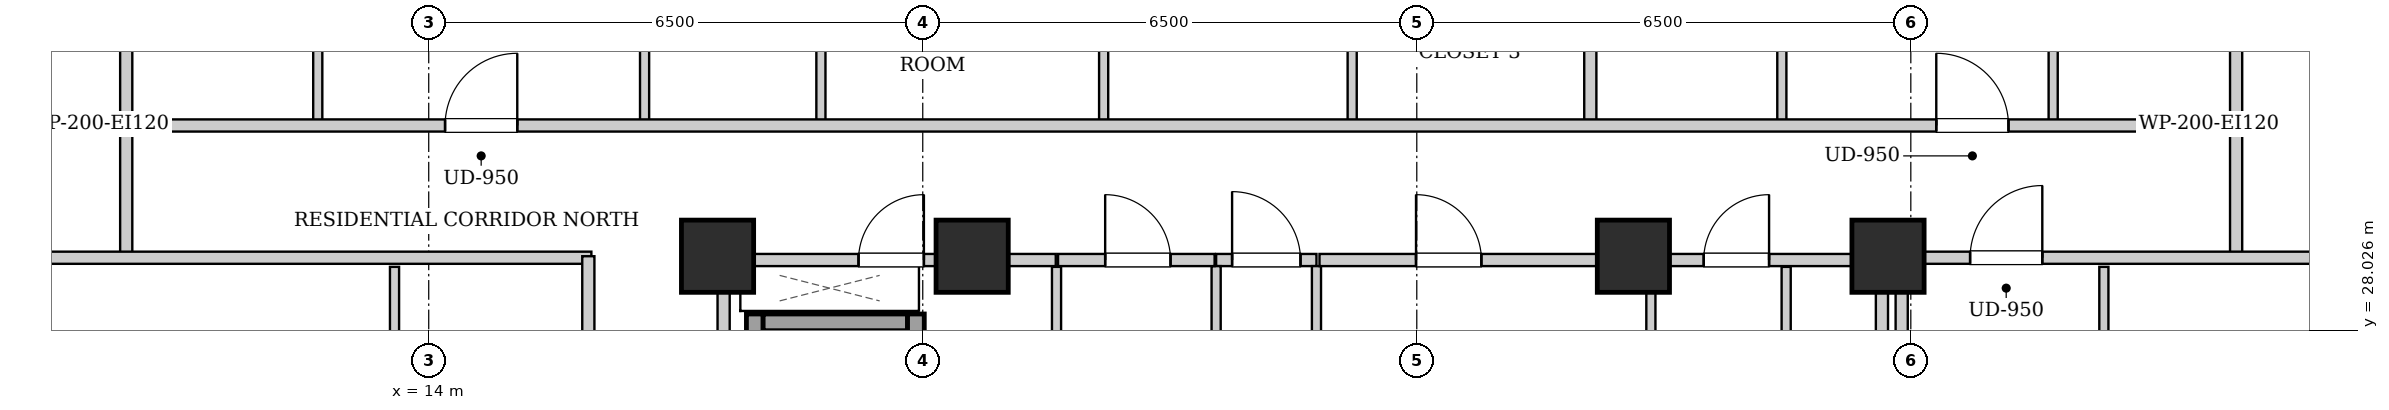
"""IFC4 building model, lengths in metres.
Left out: names, types, materials, properties, quantities, classifications, styles, units other than length and angle.
Written with IfcOpenShell. Run it as: python <this file> out.ifc"""

import sys

from ifc_helpers import new_model, si_unit, direction, frame, frame_2d, origin, origin_2d, place, context, subcontext, project, spatial, rectangle, extrude, element, fill, save


model = new_model("IFC4")
c1 = context("Model", 3, precision=1e-05, world=origin(), true_north=direction((0.0, 1.0)))
c2 = subcontext(c1, "Body", "Model", "MODEL_VIEW")
j1 = project(units=[si_unit("LENGTHUNIT", "METRE"), si_unit("PLANEANGLEUNIT", "RADIAN")], contexts=[c1])
p1 = place(None, origin())
s1 = spatial("IfcSite", under=j1, at=p1, CompositionType="ELEMENT")
p2 = place(p1, origin())
s2 = spatial("IfcBuilding", under=s1, at=p2, CompositionType="ELEMENT")
p3 = place(p2, frame((0.0, 0.0, 134.15)))
s3 = spatial("IfcBuildingStorey", under=s2, at=p3, CompositionType="ELEMENT", Elevation=134.15)
for number, where, z_axis, x_axis in (
    (1, (17.8, 29.0, 0.0), (0.0, 0.0, 1.0), (1.0, 0.0, 0.0)),
    (2, (21.15, 29.0, 0.0), (0.0, 0.0, 1.0), (1.0, 0.0, 0.0)),
    (3, (29.85, 29.0, 0.0), (0.0, 0.0, 1.0), (1.0, 0.0, 0.0)),
    (4, (33.2, 29.0, 0.0), (0.0, 0.0, 1.0), (1.0, 0.0, 0.0)),
):
    element("IfcColumn", number, at=place(p3, frame(where, z_axis=z_axis, x_axis=x_axis)), inside=s3, PredefinedType="COLUMN", context=c2, shape_type="SweptSolid", body=[
        extrude(rectangle(XDim=0.95, YDim=0.95, at=origin_2d()), origin(), (0.0, 0.0, 1.0), 3.25),
    ])
p4 = place(p3, frame((18.29, 24.1, 0.0), z_axis=(0.0, 0.0, 1.0), x_axis=(0.0, 1.0, 0.0)))
e5 = element("IfcWall", 5, at=p4, inside=s3, PredefinedType="SHEAR", context=c2, shape_type="SweptSolid", body=[
    extrude(rectangle(XDim=4.14, YDim=0.22, at=frame_2d((2.07, 0.0))), origin(), (0.0, 0.0, 1.0), 2.99),
])
p5 = place(p3, frame((18.4, 28.13, 0.0), z_axis=(0.0, 0.0, 1.0), x_axis=(1.0, 0.0, 0.0)))
e6 = element("IfcWall", 6, at=p5, inside=s3, PredefinedType="SHEAR", context=c2, shape_type="SweptSolid", body=[
    extrude(rectangle(XDim=1.9, YDim=0.22, at=frame_2d((0.95, 0.0))), origin(), (0.0, 0.0, 1.0), 2.99),
])
p6 = place(p3, frame((20.41, 26.06, 0.0), z_axis=(0.0, 0.0, 1.0), x_axis=(0.0, 1.0, 0.0)))
e7 = element("IfcWall", 7, at=p6, inside=s3, PredefinedType="SHEAR", context=c2, shape_type="SweptSolid", body=[
    extrude(rectangle(XDim=2.18, YDim=0.22, at=frame_2d((1.09, 0.0))), origin(), (0.0, 0.0, 1.0), 2.99),
])
for number, where, z_axis, x_axis in (
    (8, (17.88, 24.12, 0.0), (0.0, 0.0, 1.0), (0.0, 1.0, 0.0)),
    (9, (33.12, 24.12, 0.0), (0.0, 0.0, 1.0), (0.0, 1.0, 0.0)),
):
    element("IfcWall", number, at=place(p3, frame(where, z_axis=z_axis, x_axis=x_axis)), inside=s3, PredefinedType="PARTITIONING", context=c2, shape_type="SweptSolid", body=[
        extrude(rectangle(XDim=4.76, YDim=0.16, at=frame_2d((2.38, 0.0))), origin(), (0.0, 0.0, 1.0), 2.99),
    ])
p7 = place(p3, frame((24.36, 28.95, 0.0), z_axis=(0.0, 0.0, 1.0), x_axis=(1.0, 0.0, 0.0)))
e10 = element("IfcWall", 10, at=p7, inside=s3, PredefinedType="PARTITIONING", context=c2, shape_type="SweptSolid", body=[
    extrude(rectangle(XDim=1.32, YDim=0.16, at=frame_2d((0.66, 0.0))), origin(), (0.0, 0.0, 1.0), 2.426),
])
p8 = place(p7, frame((0.21, 0.0, 0.0)))
e11 = element("IfcOpeningElement", 11, at=p8, cuts=e10, PredefinedType="OPENING", context=c2, shape_type="SweptSolid", body=[
    extrude(rectangle(XDim=0.9, YDim=2.05, at=frame_2d((0.45, 1.025))), frame((0.0, 0.09, 0.0), z_axis=(0.0, -1.0, 0.0), x_axis=(1.0, 0.0, 0.0)), (0.0, 0.0, 1.0), 0.18),
])
p9 = place(p3, frame((17.96, 28.95, 0.0), z_axis=(0.0, 0.0, 1.0), x_axis=(1.0, 0.0, 0.0)))
e12 = element("IfcWall", 12, at=p9, inside=s3, PredefinedType="PARTITIONING", context=c2, shape_type="SweptSolid", body=[
    extrude(rectangle(XDim=4.29, YDim=0.16, at=frame_2d((2.145, 0.0))), origin(), (0.0, 0.0, 1.0), 2.426),
])
p10 = place(p9, frame((1.695, 0.0, 0.0)))
e13 = element("IfcOpeningElement", 13, at=p10, cuts=e12, PredefinedType="OPENING", context=c2, shape_type="SweptSolid", body=[
    extrude(rectangle(XDim=0.86, YDim=2.05, at=frame_2d((0.43, 1.025))), frame((0.0, 0.09, 0.0), z_axis=(0.0, -1.0, 0.0), x_axis=(1.0, 0.0, 0.0)), (0.0, 0.0, 1.0), 0.18),
])
for number, where, z_axis, x_axis in (
    (14, (24.36, 25.0, 0.0), (0.0, 0.0, 1.0), (0.0, 1.0, 0.0)),
    (15, (25.68, 25.0, 0.0), (0.0, 0.0, 1.0), (0.0, 1.0, 0.0)),
):
    element("IfcWall", number, at=place(p3, frame(where, z_axis=z_axis, x_axis=x_axis)), inside=s3, PredefinedType="PARTITIONING", context=c2, shape_type="SweptSolid", body=[
        extrude(rectangle(XDim=3.87, YDim=0.12, at=frame_2d((1.935, 0.0))), origin(), (0.0, 0.0, 1.0), 2.99),
    ])
p11 = place(p3, frame((30.08, 26.18, 0.0), z_axis=(0.0, 0.0, 1.0), x_axis=(0.0, 1.0, 0.0)))
e16 = element("IfcWall", 16, at=p11, inside=s3, PredefinedType="PARTITIONING", context=c2, shape_type="SweptSolid", body=[
    extrude(rectangle(XDim=2.68, YDim=0.12, at=frame_2d((1.34, 0.0))), origin(), (0.0, 0.0, 1.0), 2.99),
])
p12 = place(p3, frame((31.86, 26.2, 0.0), z_axis=(0.0, 0.0, 1.0), x_axis=(0.0, 1.0, 0.0)))
e17 = element("IfcWall", 17, at=p12, inside=s3, PredefinedType="PARTITIONING", context=c2, shape_type="SweptSolid", body=[
    extrude(rectangle(XDim=2.66, YDim=0.12, at=frame_2d((1.33, 0.0))), origin(), (0.0, 0.0, 1.0), 2.99),
])
p13 = place(p12, frame((0.92, 0.0, 0.0)))
e18 = element("IfcOpeningElement", 18, at=p13, cuts=e17, PredefinedType="OPENING", context=c2, shape_type="SweptSolid", body=[
    extrude(rectangle(XDim=0.86, YDim=2.05, at=frame_2d((0.43, 1.025))), frame((0.0, 0.07, 0.0), z_axis=(0.0, -1.0, 0.0), x_axis=(1.0, 0.0, 0.0)), (0.0, 0.0, 1.0), 0.14),
])
p14 = place(p3, frame((30.08, 28.95, 0.0), z_axis=(0.0, 0.0, 1.0), x_axis=(1.0, 0.0, 0.0)))
e19 = element("IfcWall", 19, at=p14, inside=s3, PredefinedType="PARTITIONING", context=c2, shape_type="SweptSolid", body=[
    extrude(rectangle(XDim=2.96, YDim=0.16, at=frame_2d((1.48, 0.0))), origin(), (0.0, 0.0, 1.0), 2.99),
])
p15 = place(p14, frame((0.695, 0.0, 0.0)))
e20 = element("IfcOpeningElement", 20, at=p15, cuts=e19, PredefinedType="OPENING", context=c2, shape_type="SweptSolid", body=[
    extrude(rectangle(XDim=0.86, YDim=2.05, at=frame_2d((0.43, 1.025))), frame((0.0, 0.09, 0.0), z_axis=(0.0, -1.0, 0.0), x_axis=(1.0, 0.0, 0.0)), (0.0, 0.0, 1.0), 0.18),
])
p16 = place(p3, frame((22.26, 25.0, 0.0), z_axis=(0.0, 0.0, 1.0), x_axis=(0.0, 1.0, 0.0)))
e21 = element("IfcWall", 21, at=p16, inside=s3, PredefinedType="PARTITIONING", context=c2, shape_type="SweptSolid", body=[
    extrude(rectangle(XDim=3.86, YDim=0.12, at=frame_2d((1.93, 0.0))), origin(), (0.0, 0.0, 1.0), 2.99),
])
p17 = place(p3, frame((22.28, 28.95, 0.0), z_axis=(0.0, 0.0, 1.0), x_axis=(1.0, 0.0, 0.0)))
e22 = element("IfcWall", 22, at=p17, inside=s3, PredefinedType="PARTITIONING", context=c2, shape_type="SweptSolid", body=[
    extrude(rectangle(XDim=2.06, YDim=0.16, at=frame_2d((1.03, 0.0))), origin(), (0.0, 0.0, 1.0), 2.426),
])
p18 = place(p17, frame((0.62, 0.0, 0.0)))
e23 = element("IfcOpeningElement", 23, at=p18, cuts=e22, PredefinedType="OPENING", context=c2, shape_type="SweptSolid", body=[
    extrude(rectangle(XDim=0.86, YDim=2.05, at=frame_2d((0.43, 1.025))), frame((0.0, 0.09, 0.0), z_axis=(0.0, -1.0, 0.0), x_axis=(1.0, 0.0, 0.0)), (0.0, 0.0, 1.0), 0.18),
])
p19 = place(p3, frame((25.72, 28.95, 0.0), z_axis=(0.0, 0.0, 1.0), x_axis=(1.0, 0.0, 0.0)))
e24 = element("IfcWall", 24, at=p19, inside=s3, PredefinedType="PARTITIONING", context=c2, shape_type="SweptSolid", body=[
    extrude(rectangle(XDim=4.32, YDim=0.16, at=frame_2d((2.16, 0.0))), origin(), (0.0, 0.0, 1.0), 2.426),
])
p20 = place(p19, frame((1.27, 0.0, 0.0)))
e25 = element("IfcOpeningElement", 25, at=p20, cuts=e24, PredefinedType="OPENING", context=c2, shape_type="SweptSolid", body=[
    extrude(rectangle(XDim=0.86, YDim=2.05, at=frame_2d((0.43, 1.025))), frame((0.0, 0.09, 0.0), z_axis=(0.0, -1.0, 0.0), x_axis=(1.0, 0.0, 0.0)), (0.0, 0.0, 1.0), 0.18),
])
for number, where, z_axis, x_axis in (
    (26, (10.02, 28.98, 0.0), (0.0, 0.0, 1.0), (0.0, 1.0, 0.0)),
    (27, (37.78, 28.98, 0.0), (0.0, 0.0, 1.0), (0.0, 1.0, 0.0)),
):
    element("IfcWall", number, at=place(p3, frame(where, z_axis=z_axis, x_axis=x_axis)), inside=s3, PredefinedType="PARTITIONING", context=c2, shape_type="SweptSolid", body=[
        extrude(rectangle(XDim=1.74, YDim=0.16, at=frame_2d((0.87, 0.0))), origin(), (0.0, 0.0, 1.0), 2.99),
    ])
p21 = place(p3, frame((7.78, 28.98, 0.0), z_axis=(0.0, 0.0, 1.0), x_axis=(1.0, 0.0, 0.0)))
e28 = element("IfcWall", 28, at=p21, inside=s3, PredefinedType="PARTITIONING", context=c2, shape_type="SweptSolid", body=[
    extrude(rectangle(XDim=8.36, YDim=0.16, at=frame_2d((4.18, 0.0))), origin(), (0.0, 0.0, 1.0), 2.426),
])
p22 = place(p3, frame((10.02, 30.76, 0.0), z_axis=(0.0, 0.0, 1.0), x_axis=(0.0, 1.0, 0.0)))
e29 = element("IfcWall", 29, at=p22, inside=s3, PredefinedType="PARTITIONING", context=c2, shape_type="SweptSolid", body=[
    extrude(rectangle(XDim=2.91, YDim=0.16, at=frame_2d((1.455, 0.0))), origin(), (0.0, 0.0, 1.0), 2.99),
])
p23 = place(p3, frame((12.54, 30.76, 0.0), z_axis=(0.0, 0.0, 1.0), x_axis=(0.0, 1.0, 0.0)))
e30 = element("IfcWall", 30, at=p23, inside=s3, PredefinedType="PARTITIONING", context=c2, shape_type="SweptSolid", body=[
    extrude(rectangle(XDim=2.85, YDim=0.12, at=frame_2d((1.425, 0.0))), origin(), (0.0, 0.0, 1.0), 2.99),
])
p24 = place(p23, frame((0.995, 0.0, 0.0)))
e31 = element("IfcOpeningElement", 31, at=p24, cuts=e30, PredefinedType="OPENING", context=c2, shape_type="SweptSolid", body=[
    extrude(rectangle(XDim=0.86, YDim=2.05, at=frame_2d((0.43, 1.025))), frame((0.0, 0.07, 0.0), z_axis=(0.0, -1.0, 0.0), x_axis=(1.0, 0.0, 0.0)), (0.0, 0.0, 1.0), 0.14),
])
p25 = place(p3, frame((16.84, 30.76, 0.0), z_axis=(0.0, 0.0, 1.0), x_axis=(0.0, 1.0, 0.0)))
e32 = element("IfcWall", 32, at=p25, inside=s3, PredefinedType="PARTITIONING", context=c2, shape_type="SweptSolid", body=[
    extrude(rectangle(XDim=2.85, YDim=0.12, at=frame_2d((1.425, 0.0))), origin(), (0.0, 0.0, 1.0), 2.99),
])
p26 = place(p25, frame((0.975, 0.0, 0.0)))
e33 = element("IfcOpeningElement", 33, at=p26, cuts=e32, PredefinedType="OPENING", context=c2, shape_type="SweptSolid", body=[
    extrude(rectangle(XDim=0.9, YDim=2.05, at=frame_2d((0.45, 1.025))), frame((0.0, 0.07, 0.0), z_axis=(0.0, -1.0, 0.0), x_axis=(1.0, 0.0, 0.0)), (0.0, 0.0, 1.0), 0.14),
])
p27 = place(p3, frame((19.16, 30.76, 0.0), z_axis=(0.0, 0.0, 1.0), x_axis=(0.0, 1.0, 0.0)))
e34 = element("IfcWall", 34, at=p27, inside=s3, PredefinedType="PARTITIONING", context=c2, shape_type="SweptSolid", body=[
    extrude(rectangle(XDim=2.85, YDim=0.12, at=frame_2d((1.425, 0.0))), origin(), (0.0, 0.0, 1.0), 2.99),
])
p28 = place(p27, frame((0.975, 0.0, 0.0)))
e35 = element("IfcOpeningElement", 35, at=p28, cuts=e34, PredefinedType="OPENING", context=c2, shape_type="SweptSolid", body=[
    extrude(rectangle(XDim=0.9, YDim=2.05, at=frame_2d((0.45, 1.025))), frame((0.0, 0.07, 0.0), z_axis=(0.0, -1.0, 0.0), x_axis=(1.0, 0.0, 0.0)), (0.0, 0.0, 1.0), 0.14),
])
p29 = place(p3, frame((22.88, 30.76, 0.0), z_axis=(0.0, 0.0, 1.0), x_axis=(0.0, 1.0, 0.0)))
e36 = element("IfcWall", 36, at=p29, inside=s3, PredefinedType="PARTITIONING", context=c2, shape_type="SweptSolid", body=[
    extrude(rectangle(XDim=2.85, YDim=0.12, at=frame_2d((1.425, 0.0))), origin(), (0.0, 0.0, 1.0), 2.99),
])
p30 = place(p29, frame((0.975, 0.0, 0.0)))
e37 = element("IfcOpeningElement", 37, at=p30, cuts=e36, PredefinedType="OPENING", context=c2, shape_type="SweptSolid", body=[
    extrude(rectangle(XDim=0.9, YDim=2.05, at=frame_2d((0.45, 1.025))), frame((0.0, 0.07, 0.0), z_axis=(0.0, -1.0, 0.0), x_axis=(1.0, 0.0, 0.0)), (0.0, 0.0, 1.0), 0.14),
])
p31 = place(p3, frame((26.15, 30.76, 0.0), z_axis=(0.0, 0.0, 1.0), x_axis=(0.0, 1.0, 0.0)))
e38 = element("IfcWall", 38, at=p31, inside=s3, PredefinedType="PARTITIONING", context=c2, shape_type="SweptSolid", body=[
    extrude(rectangle(XDim=2.85, YDim=0.12, at=frame_2d((1.425, 0.0))), origin(), (0.0, 0.0, 1.0), 2.99),
])
p32 = place(p31, frame((0.975, 0.0, 0.0)))
e39 = element("IfcOpeningElement", 39, at=p32, cuts=e38, PredefinedType="OPENING", context=c2, shape_type="SweptSolid", body=[
    extrude(rectangle(XDim=0.9, YDim=2.05, at=frame_2d((0.45, 1.025))), frame((0.0, 0.07, 0.0), z_axis=(0.0, -1.0, 0.0), x_axis=(1.0, 0.0, 0.0)), (0.0, 0.0, 1.0), 0.14),
])
p33 = place(p3, frame((37.78, 30.76, 0.0), z_axis=(0.0, 0.0, 1.0), x_axis=(0.0, 1.0, 0.0)))
e40 = element("IfcWall", 40, at=p33, inside=s3, PredefinedType="PARTITIONING", context=c2, shape_type="SweptSolid", body=[
    extrude(rectangle(XDim=2.91, YDim=0.16, at=frame_2d((1.455, 0.0))), origin(), (0.0, 0.0, 1.0), 2.99),
])
p34 = place(p3, frame((29.283, 30.76, 0.0), z_axis=(0.0, 0.0, 1.0), x_axis=(0.0, 1.0, 0.0)))
e41 = element("IfcWall", 41, at=p34, inside=s3, PredefinedType="PARTITIONING", context=c2, shape_type="SweptSolid", body=[
    extrude(rectangle(XDim=12.26, YDim=0.16, at=frame_2d((6.13, 0.0))), origin(), (0.0, 0.0, 1.0), 2.99),
])
p35 = place(p3, frame((31.803, 30.76, 0.0), z_axis=(0.0, 0.0, 1.0), x_axis=(0.0, 1.0, 0.0)))
e42 = element("IfcWall", 42, at=p35, inside=s3, PredefinedType="PARTITIONING", context=c2, shape_type="SweptSolid", body=[
    extrude(rectangle(XDim=2.85, YDim=0.12, at=frame_2d((1.425, 0.0))), origin(), (0.0, 0.0, 1.0), 2.99),
])
p36 = place(p35, frame((0.995, 0.0, 0.0)))
e43 = element("IfcOpeningElement", 43, at=p36, cuts=e42, PredefinedType="OPENING", context=c2, shape_type="SweptSolid", body=[
    extrude(rectangle(XDim=0.86, YDim=2.05, at=frame_2d((0.43, 1.025))), frame((0.0, 0.07, 0.0), z_axis=(0.0, -1.0, 0.0), x_axis=(1.0, 0.0, 0.0)), (0.0, 0.0, 1.0), 0.14),
])
p37 = place(p3, frame((35.373, 30.76, 0.0), z_axis=(0.0, 0.0, 1.0), x_axis=(0.0, 1.0, 0.0)))
e44 = element("IfcWall", 44, at=p37, inside=s3, PredefinedType="PARTITIONING", context=c2, shape_type="SweptSolid", body=[
    extrude(rectangle(XDim=2.85, YDim=0.12, at=frame_2d((1.425, 0.0))), origin(), (0.0, 0.0, 1.0), 2.99),
])
p38 = place(p37, frame((0.975, 0.0, 0.0)))
e45 = element("IfcOpeningElement", 45, at=p38, cuts=e44, PredefinedType="OPENING", context=c2, shape_type="SweptSolid", body=[
    extrude(rectangle(XDim=0.9, YDim=2.05, at=frame_2d((0.45, 1.025))), frame((0.0, 0.07, 0.0), z_axis=(0.0, -1.0, 0.0), x_axis=(1.0, 0.0, 0.0)), (0.0, 0.0, 1.0), 0.14),
])
p39 = place(p3, frame((13.55, 24.552, 0.0), z_axis=(0.0, 0.0, 1.0), x_axis=(0.0, 1.0, 0.0)))
e46 = element("IfcWall", 46, at=p39, inside=s3, PredefinedType="PARTITIONING", context=c2, shape_type="SweptSolid", body=[
    extrude(rectangle(XDim=4.308, YDim=0.12, at=frame_2d((2.154, 0.0))), origin(), (0.0, 0.0, 1.0), 2.99),
])
p40 = place(p39, frame((1.704, 0.0, 0.0)))
e47 = element("IfcOpeningElement", 47, at=p40, cuts=e46, PredefinedType="OPENING", context=c2, shape_type="SweptSolid", body=[
    extrude(rectangle(XDim=0.9, YDim=2.05, at=frame_2d((0.45, 1.025))), frame((0.0, 0.07, 0.0), z_axis=(0.0, -1.0, 0.0), x_axis=(1.0, 0.0, 0.0)), (0.0, 0.0, 1.0), 0.14),
])
p41 = place(p3, frame((33.38, 28.98, 0.0), z_axis=(0.0, 0.0, 1.0), x_axis=(1.0, 0.0, 0.0)))
e48 = element("IfcWall", 48, at=p41, inside=s3, PredefinedType="PARTITIONING", context=c2, shape_type="SweptSolid", body=[
    extrude(rectangle(XDim=6.64, YDim=0.16, at=frame_2d((3.32, 0.0))), origin(), (0.0, 0.0, 1.0), 2.426),
])
p42 = place(p41, frame((0.9, 0.0, 0.0)))
e49 = element("IfcOpeningElement", 49, at=p42, cuts=e48, PredefinedType="OPENING", context=c2, shape_type="SweptSolid", body=[
    extrude(rectangle(XDim=0.95, YDim=2.1, at=frame_2d((0.475, 1.05))), frame((0.0, 0.09, 0.0), z_axis=(0.0, -1.0, 0.0), x_axis=(1.0, 0.0, 0.0)), (0.0, 0.0, 1.0), 0.18),
])
p43 = place(p3, frame((36.04, 25.052, 0.0), z_axis=(0.0, 0.0, 1.0), x_axis=(0.0, 1.0, 0.0)))
e50 = element("IfcWall", 50, at=p43, inside=s3, PredefinedType="PARTITIONING", context=c2, shape_type="SweptSolid", body=[
    extrude(rectangle(XDim=3.808, YDim=0.12, at=frame_2d((1.904, 0.0))), origin(), (0.0, 0.0, 1.0), 2.99),
])
p44 = place(p43, frame((1.454, 0.0, 0.0)))
e51 = element("IfcOpeningElement", 51, at=p44, cuts=e50, PredefinedType="OPENING", context=c2, shape_type="SweptSolid", body=[
    extrude(rectangle(XDim=0.9, YDim=2.05, at=frame_2d((0.45, 1.025))), frame((0.0, 0.07, 0.0), z_axis=(0.0, -1.0, 0.0), x_axis=(1.0, 0.0, 0.0)), (0.0, 0.0, 1.0), 0.14),
])
p45 = place(p3, frame((10.05, 30.72, 0.0), z_axis=(0.0, 0.0, 1.0), x_axis=(1.0, 0.0, 0.0)))
e52 = element("IfcWall", 52, at=p45, inside=s3, PredefinedType="PARTITIONING", context=c2, shape_type="SweptSolid", body=[
    extrude(rectangle(XDim=27.7, YDim=0.16, at=frame_2d((13.85, 0.0))), origin(), (0.0, 0.0, 1.0), 2.99),
])
p46 = place(p45, frame((4.165, 0.0, 0.0)))
e53 = element("IfcOpeningElement", 53, at=p46, cuts=e52, PredefinedType="OPENING", context=c2, shape_type="SweptSolid", body=[
    extrude(rectangle(XDim=0.95, YDim=2.1, at=frame_2d((0.475, 1.05))), frame((0.0, 0.09, 0.0), z_axis=(0.0, -1.0, 0.0), x_axis=(1.0, 0.0, 0.0)), (0.0, 0.0, 1.0), 0.18),
])
p47 = place(p45, frame((23.785, 0.0, 0.0)))
e54 = element("IfcOpeningElement", 54, at=p47, cuts=e52, PredefinedType="OPENING", context=c2, shape_type="SweptSolid", body=[
    extrude(rectangle(XDim=0.95, YDim=2.1, at=frame_2d((0.475, 1.05))), frame((0.0, 0.09, 0.0), z_axis=(0.0, -1.0, 0.0), x_axis=(1.0, 0.0, 0.0)), (0.0, 0.0, 1.0), 0.18),
])
p48 = place(p3, frame((16.1, 15.07, 0.0), z_axis=(0.0, 0.0, 1.0), x_axis=(0.0, 1.0, 0.0)))
e55 = element("IfcWall", 55, at=p48, inside=s3, PredefinedType="PARTITIONING", context=c2, shape_type="SweptSolid", body=[
    extrude(rectangle(XDim=13.93, YDim=0.16, at=frame_2d((6.965, 0.0))), origin(), (0.0, 0.0, 1.0), 2.99),
])
p49 = place(p48, frame((4.385, 0.0, 0.0)))
e56 = element("IfcOpeningElement", 56, at=p49, cuts=e55, PredefinedType="OPENING", context=c2, shape_type="SweptSolid", body=[
    extrude(rectangle(XDim=0.95, YDim=2.1, at=frame_2d((0.475, 1.05))), frame((0.0, 0.09, 0.0), z_axis=(0.0, -1.0, 0.0), x_axis=(1.0, 0.0, 0.0)), (0.0, 0.0, 1.0), 0.18),
])
p50 = place(p3, frame((33.38, 15.02, 0.0), z_axis=(0.0, 0.0, 1.0), x_axis=(0.0, 1.0, 0.0)))
e57 = element("IfcWall", 57, at=p50, inside=s3, PredefinedType="PARTITIONING", context=c2, shape_type="SweptSolid", body=[
    extrude(rectangle(XDim=13.98, YDim=0.16, at=frame_2d((6.99, 0.0))), origin(), (0.0, 0.0, 1.0), 2.99),
])
p51 = place(p8, origin())
e58 = element("IfcDoor", 58, at=p51, inside=s3, OperationType="SINGLE_SWING_LEFT", PredefinedType="DOOR", context=c2, shape_type="SweptSolid", body=[
    extrude(rectangle(XDim=0.9, YDim=2.05, at=frame_2d((0.45, 1.025))), frame((0.0, 0.025, 0.0), z_axis=(0.0, -1.0, 0.0), x_axis=(1.0, 0.0, 0.0)), (0.0, 0.0, 1.0), 0.05),
])
fill(e11, e58)
p52 = place(p10, origin())
e59 = element("IfcDoor", 59, at=p52, inside=s3, OperationType="SINGLE_SWING_RIGHT", PredefinedType="DOOR", context=c2, shape_type="SweptSolid", body=[
    extrude(rectangle(XDim=0.86, YDim=2.05, at=frame_2d((0.43, 1.025))), frame((0.0, 0.025, 0.0), z_axis=(0.0, -1.0, 0.0), x_axis=(1.0, 0.0, 0.0)), (0.0, 0.0, 1.0), 0.05),
])
fill(e13, e59)
p53 = place(p15, origin())
e60 = element("IfcDoor", 60, at=p53, inside=s3, OperationType="SINGLE_SWING_RIGHT", PredefinedType="DOOR", context=c2, shape_type="SweptSolid", body=[
    extrude(rectangle(XDim=0.86, YDim=2.05, at=frame_2d((0.43, 1.025))), frame((0.0, 0.025, 0.0), z_axis=(0.0, -1.0, 0.0), x_axis=(1.0, 0.0, 0.0)), (0.0, 0.0, 1.0), 0.05),
])
fill(e20, e60)
p54 = place(p18, origin())
e61 = element("IfcDoor", 61, at=p54, inside=s3, OperationType="SINGLE_SWING_LEFT", PredefinedType="DOOR", context=c2, shape_type="SweptSolid", body=[
    extrude(rectangle(XDim=0.86, YDim=2.05, at=frame_2d((0.43, 1.025))), frame((0.0, 0.025, 0.0), z_axis=(0.0, -1.0, 0.0), x_axis=(1.0, 0.0, 0.0)), (0.0, 0.0, 1.0), 0.05),
])
fill(e23, e61)
p55 = place(p20, origin())
e62 = element("IfcDoor", 62, at=p55, inside=s3, OperationType="SINGLE_SWING_LEFT", PredefinedType="DOOR", context=c2, shape_type="SweptSolid", body=[
    extrude(rectangle(XDim=0.86, YDim=2.05, at=frame_2d((0.43, 1.025))), frame((0.0, 0.025, 0.0), z_axis=(0.0, -1.0, 0.0), x_axis=(1.0, 0.0, 0.0)), (0.0, 0.0, 1.0), 0.05),
])
fill(e25, e62)
p56 = place(p42, origin())
e63 = element("IfcDoor", 63, at=p56, inside=s3, OperationType="SINGLE_SWING_RIGHT", PredefinedType="DOOR", context=c2, shape_type="SweptSolid", body=[
    extrude(rectangle(XDim=0.95, YDim=2.1, at=frame_2d((0.475, 1.05))), frame((0.0, 0.025, 0.0), z_axis=(0.0, -1.0, 0.0), x_axis=(1.0, 0.0, 0.0)), (0.0, 0.0, 1.0), 0.05),
])
fill(e49, e63)
p57 = place(p46, origin())
e64 = element("IfcDoor", 64, at=p57, inside=s3, OperationType="SINGLE_SWING_RIGHT", PredefinedType="DOOR", context=c2, shape_type="SweptSolid", body=[
    extrude(rectangle(XDim=0.95, YDim=2.1, at=frame_2d((0.475, 1.05))), frame((0.0, 0.025, 0.0), z_axis=(0.0, -1.0, 0.0), x_axis=(1.0, 0.0, 0.0)), (0.0, 0.0, 1.0), 0.05),
])
fill(e53, e64)
p58 = place(p47, origin())
e65 = element("IfcDoor", 65, at=p58, inside=s3, OperationType="SINGLE_SWING_LEFT", PredefinedType="DOOR", context=c2, shape_type="SweptSolid", body=[
    extrude(rectangle(XDim=0.95, YDim=2.1, at=frame_2d((0.475, 1.05))), frame((0.0, 0.025, 0.0), z_axis=(0.0, -1.0, 0.0), x_axis=(1.0, 0.0, 0.0)), (0.0, 0.0, 1.0), 0.05),
])
fill(e54, e65)
save(model, sys.argv[1])
